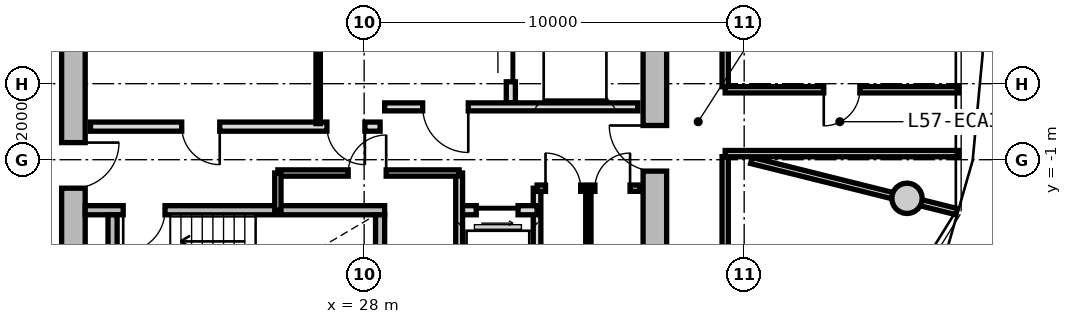
"""IFC4 building model, lengths in metres.
Left out: names, types, materials, properties, quantities, classifications, styles, units other than length and angle.
Written with IfcOpenShell. Run it as: python <this file> out.ifc"""

import sys

from ifc_helpers import new_model, si_unit, direction, frame, frame_2d, origin, origin_2d, place, context, subcontext, project, spatial, rectangle, circle, extrude, source, transform, mapped, element, fill, save


model = new_model("IFC4")
c1 = context("Model", 3, precision=1e-05, world=origin(), true_north=direction((0.0, 1.0)))
c2 = subcontext(c1, "Body", "Model", "MODEL_VIEW")
j1 = project(units=[si_unit("LENGTHUNIT", "METRE"), si_unit("PLANEANGLEUNIT", "RADIAN")], contexts=[c1])
p1 = place(None, origin())
s1 = spatial("IfcSite", under=j1, at=p1, CompositionType="ELEMENT")
p2 = place(p1, origin())
s2 = spatial("IfcBuilding", under=s1, at=p2, CompositionType="ELEMENT")
p3 = place(p2, frame((0.0, 0.0, 183.1)))
s3 = spatial("IfcBuildingStorey", under=s2, at=p3, CompositionType="ELEMENT", Elevation=183.1)
m1 = source(origin(), c2, "Body", "SweptSolid", [
    extrude(rectangle(XDim=11.1, YDim=0.62, at=frame_2d((5.55, 0.0))), origin(), (0.0, 0.0, 1.0), 2.73),
])
p4 = place(p3, frame((20.35, -5.55, 0.0), z_axis=(0.0, 0.0, 1.0), x_axis=(0.0, 1.0, 0.0)))
e1 = element("IfcWall", 1, at=p4, inside=s3, PredefinedType="SHEAR", context=c2, shape_type="MappedRepresentation", body=[
    mapped(m1, transform((0.0, 0.0, 0.0), x_axis=(1.0, 0.0, 0.0), y_axis=(0.0, 1.0, 0.0), z_axis=(0.0, 0.0, 1.0), scale=1.0)),
])
p5 = place(p4, frame((3.8, 0.0, 0.0)))
e2 = element("IfcOpeningElement", 2, at=p5, cuts=e1, PredefinedType="OPENING", context=c2, shape_type="SweptSolid", body=[
    extrude(rectangle(XDim=1.2, YDim=2.15, at=frame_2d((0.6, 1.075))), frame((0.0, 0.32, 0.0), z_axis=(0.0, -1.0, 0.0), x_axis=(1.0, 0.0, 0.0)), (0.0, 0.0, 1.0), 0.64),
])
p6 = place(p3, frame((35.65, 5.55, 0.0), z_axis=(0.0, 0.0, 1.0), x_axis=(0.0, -1.0, 0.0)))
e3 = element("IfcWall", 3, at=p6, inside=s3, PredefinedType="SHEAR", context=c2, shape_type="MappedRepresentation", body=[
    mapped(m1, transform((0.0, 0.0, 0.0), x_axis=(1.0, 0.0, 0.0), y_axis=(0.0, 1.0, 0.0), z_axis=(0.0, 0.0, 1.0), scale=1.0)),
])
p7 = place(p6, frame((5.65, 0.0, 0.0)))
e4 = element("IfcOpeningElement", 4, at=p7, cuts=e3, PredefinedType="OPENING", context=c2, shape_type="SweptSolid", body=[
    extrude(rectangle(XDim=1.2, YDim=2.15, at=frame_2d((0.6, 1.075))), frame((0.0, 0.32, 0.0), z_axis=(0.0, -1.0, 0.0), x_axis=(1.0, 0.0, 0.0)), (0.0, 0.0, 1.0), 0.64),
])
m2 = source(origin(), c2, "Body", "SweptSolid", [
    extrude(circle(Radius=0.4, at=origin_2d()), origin(), (0.0, 0.0, 1.0), 3.05),
])
p8 = place(p3, frame((42.285, -2.016, 0.0), z_axis=(0.0, 0.0, 1.0), x_axis=(1.0, 0.0, 0.0)))
e5 = element("IfcColumn", 5, at=p8, inside=s3, PredefinedType="COLUMN", context=c2, shape_type="MappedRepresentation", body=[
    mapped(m2, transform((0.0, 0.0, 0.0), x_axis=(1.0, 0.0, 0.0), y_axis=(0.0, 1.0, 0.0), z_axis=(0.0, 0.0, 1.0), scale=1.0)),
])
m3 = source(origin(), c2, "Body", "SweptSolid", [
    extrude(rectangle(XDim=7.88, YDim=0.24, at=frame_2d((3.94, 0.0))), origin(), (0.0, 0.0, 1.0), 2.73),
])
p9 = place(p3, frame((20.66, -2.33, 0.0), z_axis=(0.0, 0.0, 1.0), x_axis=(1.0, 0.0, 0.0)))
e6 = element("IfcWall", 6, at=p9, inside=s3, PredefinedType="PARTITIONING", context=c2, shape_type="MappedRepresentation", body=[
    mapped(m3, transform((0.0, 0.0, 0.0), x_axis=(1.0, 0.0, 0.0), y_axis=(0.0, 1.0, 0.0), z_axis=(0.0, 0.0, 1.0), scale=1.0)),
])
p10 = place(p9, frame((1.0, 0.0, 0.0)))
e7 = element("IfcOpeningElement", 7, at=p10, cuts=e6, PredefinedType="OPENING", context=c2, shape_type="SweptSolid", body=[
    extrude(rectangle(XDim=1.1, YDim=2.15, at=frame_2d((0.55, 1.075))), frame((0.0, 0.13, 0.0), z_axis=(0.0, -1.0, 0.0), x_axis=(1.0, 0.0, 0.0)), (0.0, 0.0, 1.0), 0.26),
])
m4 = source(origin(), c2, "Body", "SweptSolid", [
    extrude(rectangle(XDim=3.19, YDim=0.24, at=frame_2d((1.595, 0.0))), origin(), (0.0, 0.0, 1.0), 2.73),
])
for number, where, z_axis, x_axis in (
    (8, (21.38, -5.64, 0.0), (0.0, 0.0, 1.0), (0.0, 1.0, 0.0)),
    (9, (28.42, -5.64, 0.0), (0.0, 0.0, 1.0), (0.0, 1.0, 0.0)),
):
    element("IfcWall", number, at=place(p3, frame(where, z_axis=z_axis, x_axis=x_axis)), inside=s3, PredefinedType="PARTITIONING", context=c2, shape_type="MappedRepresentation", body=[
        mapped(m4, transform((0.0, 0.0, 0.0), x_axis=(1.0, 0.0, 0.0), y_axis=(0.0, 1.0, 0.0), z_axis=(0.0, 0.0, 1.0), scale=1.0)),
    ])
m5 = source(origin(), c2, "Body", "SweptSolid", [
    extrude(rectangle(XDim=5.0, YDim=0.24, at=frame_2d((2.5, 0.0))), origin(), (0.0, 0.0, 1.0), 2.715),
])
p11 = place(p3, frame((31.86, 0.5, 0.0), z_axis=(0.0, 0.0, 1.0), x_axis=(0.0, 1.0, 0.0)))
e10 = element("IfcWall", 10, at=p11, inside=s3, PredefinedType="PARTITIONING", context=c2, shape_type="MappedRepresentation", body=[
    mapped(m5, transform((0.0, 0.0, 0.0), x_axis=(1.0, 0.0, 0.0), y_axis=(0.0, 1.0, 0.0), z_axis=(0.0, 0.0, 1.0), scale=1.0)),
])
p12 = place(p11, frame((3.05, 0.0, 0.0)))
e11 = element("IfcOpeningElement", 11, at=p12, cuts=e10, PredefinedType="OPENING", context=c2, shape_type="SweptSolid", body=[
    extrude(rectangle(XDim=1.3, YDim=2.2, at=frame_2d((0.65, 1.1))), frame((0.0, 0.13, 0.0), z_axis=(0.0, -1.0, 0.0), x_axis=(1.0, 0.0, 0.0)), (0.0, 0.0, 1.0), 0.26),
])
p13 = place(p11, frame((0.55, 0.0, 0.0)))
e12 = element("IfcOpeningElement", 12, at=p13, cuts=e10, PredefinedType="OPENING", context=c2, shape_type="SweptSolid", body=[
    extrude(rectangle(XDim=1.3, YDim=2.2, at=frame_2d((0.65, 1.1))), frame((0.0, 0.13, 0.0), z_axis=(0.0, -1.0, 0.0), x_axis=(1.0, 0.0, 0.0)), (0.0, 0.0, 1.0), 0.26),
])
m6 = source(origin(), c2, "Body", "SweptSolid", [
    extrude(rectangle(XDim=6.66, YDim=0.21, at=frame_2d((3.33, 0.0))), origin(), (0.0, 0.0, 1.0), 2.715),
])
p14 = place(p3, frame((28.54, 0.39, 0.0), z_axis=(0.0, 0.0, 1.0), x_axis=(1.0, 0.0, 0.0)))
e13 = element("IfcWall", 13, at=p14, inside=s3, PredefinedType="PARTITIONING", context=c2, shape_type="MappedRepresentation", body=[
    mapped(m6, transform((0.0, 0.0, 0.0), x_axis=(1.0, 0.0, 0.0), y_axis=(0.0, 1.0, 0.0), z_axis=(0.0, 0.0, 1.0), scale=1.0)),
])
p15 = place(p14, frame((1.0, 0.0, 0.0)))
e14 = element("IfcOpeningElement", 14, at=p15, cuts=e13, PredefinedType="OPENING", context=c2, shape_type="SweptSolid", body=[
    extrude(rectangle(XDim=1.2, YDim=2.15, at=frame_2d((0.6, 1.075))), frame((0.0, 0.115, 0.0), z_axis=(0.0, -1.0, 0.0), x_axis=(1.0, 0.0, 0.0)), (0.0, 0.0, 1.0), 0.23),
])
m7 = source(origin(), c2, "Body", "SweptSolid", [
    extrude(rectangle(XDim=7.62, YDim=0.24, at=frame_2d((3.81, 0.0))), origin(), (0.0, 0.0, 1.0), 2.715),
])
p16 = place(p3, frame((20.8, -0.13, 0.0), z_axis=(0.0, 0.0, 1.0), x_axis=(1.0, 0.0, 0.0)))
e15 = element("IfcWall", 15, at=p16, inside=s3, PredefinedType="PARTITIONING", context=c2, shape_type="MappedRepresentation", body=[
    mapped(m7, transform((0.0, 0.0, 0.0), x_axis=(1.0, 0.0, 0.0), y_axis=(0.0, 1.0, 0.0), z_axis=(0.0, 0.0, 1.0), scale=1.0)),
])
p17 = place(p16, frame((6.22, 0.0, 0.0)))
e16 = element("IfcOpeningElement", 16, at=p17, cuts=e15, PredefinedType="OPENING", context=c2, shape_type="SweptSolid", body=[
    extrude(rectangle(XDim=1.0, YDim=2.1, at=frame_2d((0.5, 1.05))), frame((0.0, 0.13, 0.0), z_axis=(0.0, -1.0, 0.0), x_axis=(1.0, 0.0, 0.0)), (0.0, 0.0, 1.0), 0.26),
])
p18 = place(p16, frame((2.4, 0.0, 0.0)))
e17 = element("IfcOpeningElement", 17, at=p18, cuts=e15, PredefinedType="OPENING", context=c2, shape_type="SweptSolid", body=[
    extrude(rectangle(XDim=1.0, YDim=2.1, at=frame_2d((0.5, 1.05))), frame((0.0, 0.13, 0.0), z_axis=(0.0, -1.0, 0.0), x_axis=(1.0, 0.0, 0.0)), (0.0, 0.0, 1.0), 0.26),
])
m8 = source(origin(), c2, "Body", "SweptSolid", [
    extrude(rectangle(XDim=2.33, YDim=0.115, at=frame_2d((1.165, 0.0))), origin(), (0.0, 0.0, 1.0), 2.715),
])
p19 = place(p3, frame((26.79, -0.05, 0.0), z_axis=(0.0, 0.0, 1.0), x_axis=(0.0, 1.0, 0.0)))
e18 = element("IfcWall", 18, at=p19, inside=s3, PredefinedType="PARTITIONING", context=c2, shape_type="MappedRepresentation", body=[
    mapped(m8, transform((0.0, 0.0, 0.0), x_axis=(1.0, 0.0, 0.0), y_axis=(0.0, 1.0, 0.0), z_axis=(0.0, 0.0, 1.0), scale=1.0)),
])
m9 = source(origin(), c2, "Body", "SweptSolid", [
    extrude(rectangle(XDim=3.8, YDim=0.2, at=frame_2d((1.9, 0.0))), origin(), (0.0, 0.0, 1.0), 2.715),
])
p20 = place(p3, frame((32.55, -5.55, 0.0), z_axis=(0.0, 0.0, 1.0), x_axis=(0.0, 1.0, 0.0)))
e19 = element("IfcWall", 19, at=p20, inside=s3, PredefinedType="PARTITIONING", context=c2, shape_type="MappedRepresentation", body=[
    mapped(m9, transform((0.0, 0.0, 0.0), x_axis=(1.0, 0.0, 0.0), y_axis=(0.0, 1.0, 0.0), z_axis=(0.0, 0.0, 1.0), scale=1.0)),
])
m10 = source(origin(), c2, "Body", "SweptSolid", [
    extrude(rectangle(XDim=2.05, YDim=0.24, at=frame_2d((1.025, 0.0))), origin(), (0.0, 0.0, 1.0), 2.715),
])
p21 = place(p3, frame((30.5, -2.33, 0.0), z_axis=(0.0, 0.0, 1.0), x_axis=(1.0, 0.0, 0.0)))
e20 = element("IfcWall", 20, at=p21, inside=s3, PredefinedType="PARTITIONING", context=c2, shape_type="MappedRepresentation", body=[
    mapped(m10, transform((0.0, 0.0, 0.0), x_axis=(1.0, 0.0, 0.0), y_axis=(0.0, 1.0, 0.0), z_axis=(0.0, 0.0, 1.0), scale=1.0)),
])
p22 = place(p21, frame((0.45, 0.0, 0.0)))
e21 = element("IfcOpeningElement", 21, at=p22, cuts=e20, PredefinedType="OPENING", context=c2, shape_type="SweptSolid", body=[
    extrude(rectangle(XDim=1.1, YDim=2.2, at=frame_2d((0.55, 1.1))), frame((0.0, 0.13, 0.0), z_axis=(0.0, -1.0, 0.0), x_axis=(1.0, 0.0, 0.0)), (0.0, 0.0, 1.0), 0.26),
])
m11 = source(origin(), c2, "Body", "SweptSolid", [
    extrude(rectangle(XDim=4.2, YDim=0.18, at=frame_2d((2.1, 0.0))), origin(), (0.0, 0.0, 1.0), 2.715),
])
p23 = place(p3, frame((30.5, -5.55, 0.0), z_axis=(0.0, 0.0, 1.0), x_axis=(0.0, 1.0, 0.0)))
e22 = element("IfcWall", 22, at=p23, inside=s3, PredefinedType="PARTITIONING", context=c2, shape_type="MappedRepresentation", body=[
    mapped(m11, transform((0.0, 0.0, 0.0), x_axis=(1.0, 0.0, 0.0), y_axis=(0.0, 1.0, 0.0), z_axis=(0.0, 0.0, 1.0), scale=1.0)),
])
m12 = source(origin(), c2, "Body", "SweptSolid", [
    extrude(rectangle(XDim=4.77, YDim=0.165, at=frame_2d((2.385, 0.0))), origin(), (0.0, 0.0, 1.0), 2.715),
])
p24 = place(p3, frame((25.73, -1.35, 0.0), z_axis=(0.0, 0.0, 1.0), x_axis=(1.0, 0.0, 0.0)))
e23 = element("IfcWall", 23, at=p24, inside=s3, PredefinedType="PARTITIONING", context=c2, shape_type="MappedRepresentation", body=[
    mapped(m12, transform((0.0, 0.0, 0.0), x_axis=(1.0, 0.0, 0.0), y_axis=(0.0, 1.0, 0.0), z_axis=(0.0, 0.0, 1.0), scale=1.0)),
])
p25 = place(p24, frame((1.85, 0.0, 0.0)))
e24 = element("IfcOpeningElement", 24, at=p25, cuts=e23, PredefinedType="OPENING", context=c2, shape_type="SweptSolid", body=[
    extrude(rectangle(XDim=1.0, YDim=2.1, at=frame_2d((0.5, 1.05))), frame((0.0, 0.093, 0.0), z_axis=(0.0, -1.0, 0.0), x_axis=(1.0, 0.0, 0.0)), (0.0, 0.0, 1.0), 0.185),
])
m13 = source(origin(), c2, "Body", "SweptSolid", [
    extrude(rectangle(XDim=0.98, YDim=0.165, at=frame_2d((0.49, 0.0))), origin(), (0.0, 0.0, 1.0), 2.715),
])
p26 = place(p3, frame((25.73, -2.33, 0.0), z_axis=(0.0, 0.0, 1.0), x_axis=(0.0, 1.0, 0.0)))
e25 = element("IfcWall", 25, at=p26, inside=s3, PredefinedType="PARTITIONING", context=c2, shape_type="MappedRepresentation", body=[
    mapped(m13, transform((0.0, 0.0, 0.0), x_axis=(1.0, 0.0, 0.0), y_axis=(0.0, 1.0, 0.0), z_axis=(0.0, 0.0, 1.0), scale=1.0)),
])
m14 = source(origin(), c2, "Body", "SweptSolid", [
    extrude(rectangle(XDim=2.7, YDim=0.165, at=frame_2d((1.35, 0.0))), origin(), (0.0, 0.0, 1.0), 2.715),
])
p27 = place(p3, frame((32.55, -1.75, 0.0), z_axis=(0.0, 0.0, 1.0), x_axis=(1.0, 0.0, 0.0)))
e26 = element("IfcWall", 26, at=p27, inside=s3, PredefinedType="PARTITIONING", context=c2, shape_type="MappedRepresentation", body=[
    mapped(m14, transform((0.0, 0.0, 0.0), x_axis=(1.0, 0.0, 0.0), y_axis=(0.0, 1.0, 0.0), z_axis=(0.0, 0.0, 1.0), scale=1.0)),
])
p28 = place(p27, frame((0.222, 0.0, 0.0)))
e27 = element("IfcOpeningElement", 27, at=p28, cuts=e26, PredefinedType="OPENING", context=c2, shape_type="SweptSolid", body=[
    extrude(rectangle(XDim=0.925, YDim=2.1, at=frame_2d((0.462, 1.05))), frame((0.0, 0.093, 0.0), z_axis=(0.0, -1.0, 0.0), x_axis=(1.0, 0.0, 0.0)), (0.0, 0.0, 1.0), 0.185),
])
p29 = place(p27, frame((1.522, 0.0, 0.0)))
e28 = element("IfcOpeningElement", 28, at=p29, cuts=e26, PredefinedType="OPENING", context=c2, shape_type="SweptSolid", body=[
    extrude(rectangle(XDim=0.925, YDim=2.1, at=frame_2d((0.462, 1.05))), frame((0.0, 0.093, 0.0), z_axis=(0.0, -1.0, 0.0), x_axis=(1.0, 0.0, 0.0)), (0.0, 0.0, 1.0), 0.185),
])
m15 = source(origin(), c2, "Body", "SweptSolid", [
    extrude(rectangle(XDim=3.8, YDim=0.14, at=frame_2d((1.9, 0.0))), origin(), (0.0, 0.0, 1.0), 2.715),
])
p30 = place(p3, frame((33.9, -5.55, 0.0), z_axis=(0.0, 0.0, 1.0), x_axis=(0.0, 1.0, 0.0)))
e29 = element("IfcWall", 29, at=p30, inside=s3, PredefinedType="PARTITIONING", context=c2, shape_type="MappedRepresentation", body=[
    mapped(m15, transform((0.0, 0.0, 0.0), x_axis=(1.0, 0.0, 0.0), y_axis=(0.0, 1.0, 0.0), z_axis=(0.0, 0.0, 1.0), scale=1.0)),
])
m16 = source(origin(), c2, "Body", "SweptSolid", [
    extrude(rectangle(XDim=6.88, YDim=0.165, at=frame_2d((3.44, 0.0))), origin(), (0.0, 0.0, 1.0), 2.715),
])
for number, where, z_axis, x_axis in (
    (30, (37.5, 7.8, 0.0), (0.0, 0.0, 1.0), (0.0, -1.0, 0.0)),
    (31, (37.5, -0.92, 0.0), (0.0, 0.0, 1.0), (0.0, -1.0, 0.0)),
):
    element("IfcWall", number, at=place(p3, frame(where, z_axis=z_axis, x_axis=x_axis)), inside=s3, PredefinedType="PARTITIONING", context=c2, shape_type="MappedRepresentation", body=[
        mapped(m16, transform((0.0, 0.0, 0.0), x_axis=(1.0, 0.0, 0.0), y_axis=(0.0, 1.0, 0.0), z_axis=(0.0, 0.0, 1.0), scale=1.0)),
    ])
m17 = source(origin(), c2, "Body", "SweptSolid", [
    extrude(rectangle(XDim=5.564, YDim=0.165, at=frame_2d((2.782, 0.0))), origin(), (0.0, 0.0, 1.0), 2.265),
])
p31 = place(p3, frame((38.19, -1.02, 0.0), z_axis=(0.0, 0.0, 1.0), x_axis=(0.97031260977, -0.241854169533, 0.0)))
e32 = element("IfcWall", 32, at=p31, inside=s3, PredefinedType="PARTITIONING", context=c2, shape_type="MappedRepresentation", body=[
    mapped(m17, transform((0.0, 0.0, 0.0), x_axis=(1.0, 0.0, 0.0), y_axis=(0.0, 1.0, 0.0), z_axis=(0.0, 0.0, 1.0), scale=1.0)),
])
m18 = source(origin(), c2, "Body", "SweptSolid", [
    extrude(rectangle(XDim=6.139, YDim=0.165, at=frame_2d((3.069, 0.0))), origin(), (0.0, 0.0, 1.0), 2.715),
])
p32 = place(p3, frame((37.5, 0.84, 0.0), z_axis=(0.0, 0.0, 1.0), x_axis=(1.0, 0.0, 0.0)))
e33 = element("IfcWall", 33, at=p32, inside=s3, PredefinedType="PARTITIONING", context=c2, shape_type="MappedRepresentation", body=[
    mapped(m18, transform((0.0, 0.0, 0.0), x_axis=(1.0, 0.0, 0.0), y_axis=(0.0, 1.0, 0.0), z_axis=(0.0, 0.0, 1.0), scale=1.0)),
])
p33 = place(p32, frame((2.594, 0.0, 0.0)))
e34 = element("IfcOpeningElement", 34, at=p33, cuts=e33, PredefinedType="OPENING", context=c2, shape_type="SweptSolid", body=[
    extrude(rectangle(XDim=0.95, YDim=2.1, at=frame_2d((0.475, 1.05))), frame((0.0, 0.093, 0.0), z_axis=(0.0, -1.0, 0.0), x_axis=(1.0, 0.0, 0.0)), (0.0, 0.0, 1.0), 0.185),
])
p34 = place(p3, frame((43.639, -0.84, 0.0), z_axis=(0.0, 0.0, 1.0), x_axis=(-1.0, 0.0, 0.0)))
e35 = element("IfcWall", 35, at=p34, inside=s3, PredefinedType="PARTITIONING", context=c2, shape_type="MappedRepresentation", body=[
    mapped(m18, transform((0.0, 0.0, 0.0), x_axis=(1.0, 0.0, 0.0), y_axis=(0.0, 1.0, 0.0), z_axis=(0.0, 0.0, 1.0), scale=1.0)),
])
m19 = source(origin(), c2, "Body", "SweptSolid", [
    extrude(rectangle(XDim=1.1, YDim=2.15, at=frame_2d((0.55, 1.075))), frame((0.0, 0.025, 0.0), z_axis=(0.0, -1.0, 0.0), x_axis=(1.0, 0.0, 0.0)), (0.0, 0.0, 1.0), 0.05),
])
p35 = place(p10, frame((1.1, 0.0, 0.0), z_axis=(0.0, 0.0, 1.0), x_axis=(-1.0, 0.0, 0.0)))
e36 = element("IfcDoor", 36, at=p35, inside=s3, OperationType="SINGLE_SWING_RIGHT", PredefinedType="DOOR", context=c2, shape_type="MappedRepresentation", body=[
    mapped(m19, transform((0.0, 0.0, 0.0), x_axis=(1.0, 0.0, 0.0), y_axis=(0.0, 1.0, 0.0), z_axis=(0.0, 0.0, 1.0), scale=1.0)),
])
fill(e7, e36)
m20 = source(origin(), c2, "Body", "SweptSolid", [
    extrude(rectangle(XDim=1.3, YDim=2.2, at=frame_2d((0.65, 1.1))), frame((0.0, 0.025, 0.0), z_axis=(0.0, -1.0, 0.0), x_axis=(1.0, 0.0, 0.0)), (0.0, 0.0, 1.0), 0.05),
])
p36 = place(p13, origin())
e37 = element("IfcDoor", 37, at=p36, inside=s3, OperationType="SLIDING_TO_RIGHT", PredefinedType="DOOR", context=c2, shape_type="MappedRepresentation", body=[
    mapped(m20, transform((0.0, 0.0, 0.0), x_axis=(1.0, 0.0, 0.0), y_axis=(0.0, 1.0, 0.0), z_axis=(0.0, 0.0, 1.0), scale=1.0)),
])
fill(e12, e37)
m21 = source(origin(), c2, "Body", "SweptSolid", [
    extrude(rectangle(XDim=1.2, YDim=2.15, at=frame_2d((0.6, 1.075))), frame((0.0, 0.025, 0.0), z_axis=(0.0, -1.0, 0.0), x_axis=(1.0, 0.0, 0.0)), (0.0, 0.0, 1.0), 0.05),
])
p37 = place(p15, frame((1.2, 0.0, 0.0), z_axis=(0.0, 0.0, 1.0), x_axis=(-1.0, 0.0, 0.0)))
e38 = element("IfcDoor", 38, at=p37, inside=s3, OperationType="SINGLE_SWING_LEFT", PredefinedType="DOOR", context=c2, shape_type="MappedRepresentation", body=[
    mapped(m21, transform((0.0, 0.0, 0.0), x_axis=(1.0, 0.0, 0.0), y_axis=(0.0, 1.0, 0.0), z_axis=(0.0, 0.0, 1.0), scale=1.0)),
])
fill(e14, e38)
p38 = place(p5, frame((1.2, 0.0, 0.0), z_axis=(0.0, 0.0, 1.0), x_axis=(-1.0, 0.0, 0.0)))
e39 = element("IfcDoor", 39, at=p38, inside=s3, OperationType="SINGLE_SWING_LEFT", PredefinedType="DOOR", context=c2, shape_type="MappedRepresentation", body=[
    mapped(m21, transform((0.0, 0.0, 0.0), x_axis=(1.0, 0.0, 0.0), y_axis=(0.0, 1.0, 0.0), z_axis=(0.0, 0.0, 1.0), scale=1.0)),
])
fill(e2, e39)
p39 = place(p7, frame((1.2, 0.0, 0.0), z_axis=(0.0, 0.0, 1.0), x_axis=(-1.0, 0.0, 0.0)))
e40 = element("IfcDoor", 40, at=p39, inside=s3, OperationType="SINGLE_SWING_RIGHT", PredefinedType="DOOR", context=c2, shape_type="MappedRepresentation", body=[
    mapped(m21, transform((0.0, 0.0, 0.0), x_axis=(1.0, 0.0, 0.0), y_axis=(0.0, 1.0, 0.0), z_axis=(0.0, 0.0, 1.0), scale=1.0)),
])
fill(e4, e40)
m22 = source(origin(), c2, "Body", "SweptSolid", [
    extrude(rectangle(XDim=1.0, YDim=2.1, at=frame_2d((0.5, 1.05))), frame((0.0, 0.025, 0.0), z_axis=(0.0, -1.0, 0.0), x_axis=(1.0, 0.0, 0.0)), (0.0, 0.0, 1.0), 0.05),
])
p40 = place(p17, frame((1.0, 0.0, 0.0), z_axis=(0.0, 0.0, 1.0), x_axis=(-1.0, 0.0, 0.0)))
e41 = element("IfcDoor", 41, at=p40, inside=s3, OperationType="SINGLE_SWING_LEFT", PredefinedType="DOOR", context=c2, shape_type="MappedRepresentation", body=[
    mapped(m22, transform((0.0, 0.0, 0.0), x_axis=(1.0, 0.0, 0.0), y_axis=(0.0, 1.0, 0.0), z_axis=(0.0, 0.0, 1.0), scale=1.0)),
])
fill(e16, e41)
p41 = place(p18, frame((1.0, 0.0, 0.0), z_axis=(0.0, 0.0, 1.0), x_axis=(-1.0, 0.0, 0.0)))
e42 = element("IfcDoor", 42, at=p41, inside=s3, OperationType="SINGLE_SWING_LEFT", PredefinedType="DOOR", context=c2, shape_type="MappedRepresentation", body=[
    mapped(m22, transform((0.0, 0.0, 0.0), x_axis=(1.0, 0.0, 0.0), y_axis=(0.0, 1.0, 0.0), z_axis=(0.0, 0.0, 1.0), scale=1.0)),
])
fill(e17, e42)
m23 = source(origin(), c2, "Body", "SweptSolid", [
    extrude(rectangle(XDim=1.1, YDim=2.2, at=frame_2d((0.55, 1.1))), frame((0.0, 0.025, 0.0), z_axis=(0.0, -1.0, 0.0), x_axis=(1.0, 0.0, 0.0)), (0.0, 0.0, 1.0), 0.05),
])
p42 = place(p22, frame((1.1, 0.0, 0.0), z_axis=(0.0, 0.0, 1.0), x_axis=(-1.0, 0.0, 0.0)))
e43 = element("IfcDoor", 43, at=p42, inside=s3, OperationType="SLIDING_TO_RIGHT", PredefinedType="DOOR", context=c2, shape_type="MappedRepresentation", body=[
    mapped(m23, transform((0.0, 0.0, 0.0), x_axis=(1.0, 0.0, 0.0), y_axis=(0.0, 1.0, 0.0), z_axis=(0.0, 0.0, 1.0), scale=1.0)),
])
fill(e21, e43)
p43 = place(p25, origin())
e44 = element("IfcDoor", 44, at=p43, inside=s3, OperationType="SINGLE_SWING_RIGHT", PredefinedType="DOOR", context=c2, shape_type="MappedRepresentation", body=[
    mapped(m22, transform((0.0, 0.0, 0.0), x_axis=(1.0, 0.0, 0.0), y_axis=(0.0, 1.0, 0.0), z_axis=(0.0, 0.0, 1.0), scale=1.0)),
])
fill(e24, e44)
m24 = source(origin(), c2, "Body", "SweptSolid", [
    extrude(rectangle(XDim=0.925, YDim=2.1, at=frame_2d((0.462, 1.05))), frame((0.0, 0.025, 0.0), z_axis=(0.0, -1.0, 0.0), x_axis=(1.0, 0.0, 0.0)), (0.0, 0.0, 1.0), 0.05),
])
p44 = place(p28, origin())
e45 = element("IfcDoor", 45, at=p44, inside=s3, OperationType="SINGLE_SWING_LEFT", PredefinedType="DOOR", context=c2, shape_type="MappedRepresentation", body=[
    mapped(m24, transform((0.0, 0.0, 0.0), x_axis=(1.0, 0.0, 0.0), y_axis=(0.0, 1.0, 0.0), z_axis=(0.0, 0.0, 1.0), scale=1.0)),
])
fill(e27, e45)
p45 = place(p29, origin())
e46 = element("IfcDoor", 46, at=p45, inside=s3, OperationType="SINGLE_SWING_RIGHT", PredefinedType="DOOR", context=c2, shape_type="MappedRepresentation", body=[
    mapped(m24, transform((0.0, 0.0, 0.0), x_axis=(1.0, 0.0, 0.0), y_axis=(0.0, 1.0, 0.0), z_axis=(0.0, 0.0, 1.0), scale=1.0)),
])
fill(e28, e46)
m25 = source(origin(), c2, "Body", "SweptSolid", [
    extrude(rectangle(XDim=0.95, YDim=2.1, at=frame_2d((0.475, 1.05))), frame((0.0, 0.025, 0.0), z_axis=(0.0, -1.0, 0.0), x_axis=(1.0, 0.0, 0.0)), (0.0, 0.0, 1.0), 0.05),
])
p46 = place(p33, frame((0.95, 0.0, 0.0), z_axis=(0.0, 0.0, 1.0), x_axis=(-1.0, 0.0, 0.0)))
e47 = element("IfcDoor", 47, at=p46, inside=s3, OperationType="SINGLE_SWING_RIGHT", PredefinedType="DOOR", context=c2, shape_type="MappedRepresentation", body=[
    mapped(m25, transform((0.0, 0.0, 0.0), x_axis=(1.0, 0.0, 0.0), y_axis=(0.0, 1.0, 0.0), z_axis=(0.0, 0.0, 1.0), scale=1.0)),
])
fill(e34, e47)
save(model, sys.argv[1])
